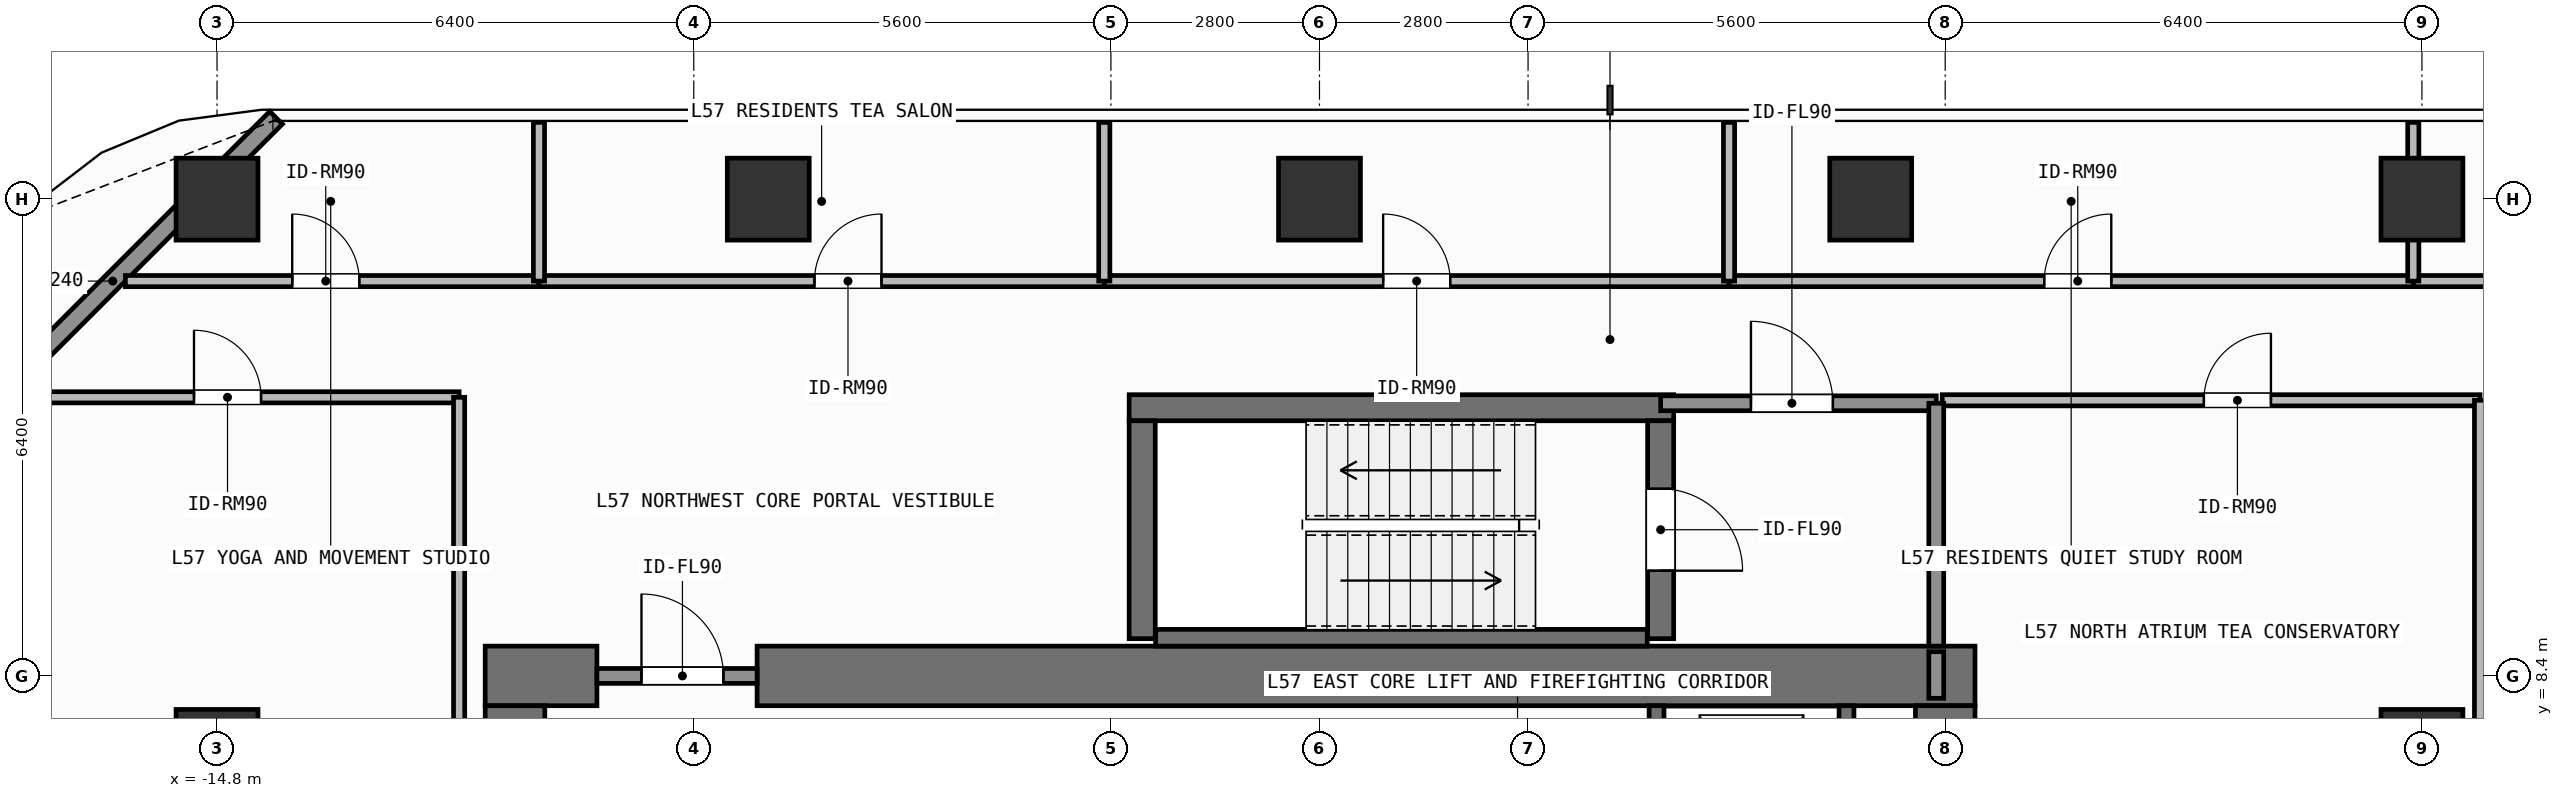
"""IFC4 building model, lengths in metres.
Left out: names, types, materials, properties, quantities, classifications, styles, units other than length and angle.
Written with IfcOpenShell. Run it as: python <this file> out.ifc"""

import sys

from ifc_helpers import new_model, si_unit, direction, frame, frame_2d, origin, origin_2d, place, context, subcontext, project, spatial, rectangle, extrude, element, fill, save


model = new_model("IFC4")
c1 = context("Model", 3, precision=1e-05, world=origin(), true_north=direction((0.0, 1.0)))
c2 = subcontext(c1, "Body", "Model", "MODEL_VIEW")
j1 = project(units=[si_unit("LENGTHUNIT", "METRE"), si_unit("PLANEANGLEUNIT", "RADIAN")], contexts=[c1])
p1 = place(None, origin())
s1 = spatial("IfcSite", under=j1, at=p1, CompositionType="ELEMENT")
p2 = place(p1, origin())
s2 = spatial("IfcBuilding", under=s1, at=p2, CompositionType="ELEMENT")
p3 = place(p2, frame((0.0, 0.0, 231.3)))
s3 = spatial("IfcBuildingStorey", under=s2, at=p3, CompositionType="ELEMENT", Elevation=231.3)
p4 = place(p3, frame((-11.2, 8.4, 0.0), z_axis=(0.0, 0.0, 1.0), x_axis=(1.0, 0.0, 0.0)))
e1 = element("IfcWall", 1, at=p4, inside=s3, PredefinedType="SHEAR", context=c2, shape_type="SweptSolid", body=[
    extrude(rectangle(XDim=1.5, YDim=0.8, at=frame_2d((0.75, 0.0))), origin(), (0.0, 0.0, 1.0), 3.9),
])
p5 = place(p3, frame((-7.55, 8.4, 0.0), z_axis=(0.0, 0.0, 1.0), x_axis=(1.0, 0.0, 0.0)))
e2 = element("IfcWall", 2, at=p5, inside=s3, PredefinedType="SHEAR", context=c2, shape_type="SweptSolid", body=[
    extrude(rectangle(XDim=16.35, YDim=0.8, at=frame_2d((8.175, 0.0))), origin(), (0.0, 0.0, 1.0), 3.9),
])
p6 = place(p3, frame((-10.8, -8.0, 0.0), z_axis=(0.0, 0.0, 1.0), x_axis=(0.0, 1.0, 0.0)))
e3 = element("IfcWall", 3, at=p6, inside=s3, PredefinedType="SHEAR", context=c2, shape_type="SweptSolid", body=[
    extrude(rectangle(XDim=16.0, YDim=0.8, at=frame_2d((8.0, 0.0))), origin(), (0.0, 0.0, 1.0), 3.9),
])
p7 = place(p3, frame((8.4, 5.825, 0.0), z_axis=(0.0, 0.0, 1.0), x_axis=(0.0, 1.0, 0.0)))
e4 = element("IfcWall", 4, at=p7, inside=s3, PredefinedType="SHEAR", context=c2, shape_type="SweptSolid", body=[
    extrude(rectangle(XDim=2.175, YDim=0.8, at=frame_2d((1.087, 0.0))), origin(), (0.0, 0.0, 1.0), 3.9),
])
p8 = place(p3, frame((-2.555, 12.0, 0.0), z_axis=(0.0, 0.0, 1.0), x_axis=(1.0, 0.0, 0.0)))
e5 = element("IfcWall", 5, at=p8, inside=s3, PredefinedType="SHEAR", context=c2, shape_type="SweptSolid", body=[
    extrude(rectangle(XDim=7.31, YDim=0.35, at=frame_2d((3.655, 0.0))), origin(), (0.0, 0.0, 1.0), 3.9),
])
p9 = place(p3, frame((-2.2, 8.913, 0.0), z_axis=(0.0, 0.0, 1.0), x_axis=(1.0, 0.0, 0.0)))
e6 = element("IfcWall", 6, at=p9, inside=s3, PredefinedType="SHEAR", context=c2, shape_type="SweptSolid", body=[
    extrude(rectangle(XDim=6.6, YDim=0.225, at=frame_2d((3.3, 0.0))), origin(), (0.0, 0.0, 1.0), 3.9),
])
p10 = place(p3, frame((-2.38, 8.9, 0.0), z_axis=(0.0, 0.0, 1.0), x_axis=(0.0, 1.0, 0.0)))
e7 = element("IfcWall", 7, at=p10, inside=s3, PredefinedType="SHEAR", context=c2, shape_type="SweptSolid", body=[
    extrude(rectangle(XDim=2.925, YDim=0.35, at=frame_2d((1.462, 0.0))), origin(), (0.0, 0.0, 1.0), 3.9),
])
p11 = place(p3, frame((4.58, 11.825, 0.0), z_axis=(0.0, 0.0, 1.0), x_axis=(0.0, -1.0, 0.0)))
e8 = element("IfcWall", 8, at=p11, inside=s3, PredefinedType="SHEAR", context=c2, shape_type="SweptSolid", body=[
    extrude(rectangle(XDim=2.925, YDim=0.35, at=frame_2d((1.462, 0.0))), origin(), (0.0, 0.0, 1.0), 3.9),
])
p12 = place(p11, frame((0.913, 0.0, 0.0)))
e9 = element("IfcOpeningElement", 9, at=p12, cuts=e8, PredefinedType="OPENING", context=c2, shape_type="SweptSolid", body=[
    extrude(rectangle(XDim=1.1, YDim=2.15, at=frame_2d((0.55, 1.075))), frame((0.0, 0.185, 0.0), z_axis=(0.0, -1.0, 0.0), x_axis=(1.0, 0.0, 0.0)), (0.0, 0.0, 1.0), 0.37),
])
for number, where, z_axis, x_axis in (
    (10, (-14.8, 14.8, 0.0), (0.0, 0.0, 1.0), (1.0, 0.0, 0.0)),
    (11, (-7.4, 14.8, 0.0), (0.0, 0.0, 1.0), (1.0, 0.0, 0.0)),
    (12, (0.0, 14.8, 0.0), (0.0, 0.0, 1.0), (1.0, 0.0, 0.0)),
    (13, (7.4, 14.8, 0.0), (0.0, 0.0, 1.0), (1.0, 0.0, 0.0)),
    (14, (14.8, 14.8, 0.0), (0.0, 0.0, 1.0), (1.0, 0.0, 0.0)),
    (15, (-14.8, 7.4, 0.0), (0.0, 0.0, 1.0), (1.0, 0.0, 0.0)),
    (16, (14.8, 7.4, 0.0), (0.0, 0.0, 1.0), (1.0, 0.0, 0.0)),
):
    element("IfcColumn", number, at=place(p3, frame(where, z_axis=z_axis, x_axis=x_axis)), inside=s3, PredefinedType="COLUMN", context=c2, shape_type="SweptSolid", body=[
        extrude(rectangle(XDim=1.1, YDim=1.1, at=origin_2d()), origin(), (0.0, 0.0, 1.0), 3.9),
    ])
p13 = place(p3, frame((-18.392, 11.508, 0.0), z_axis=(0.0, 0.0, 1.0), x_axis=(0.707106781187, 0.707106781187, 0.0)))
e17 = element("IfcWall", 17, at=p13, inside=s3, PredefinedType="SOLIDWALL", context=c2, shape_type="SweptSolid", body=[
    extrude(rectangle(XDim=6.201, YDim=0.24, at=frame_2d((3.101, 0.0))), origin(), (0.0, 0.0, 1.0), 3.6),
])
p14 = place(p3, frame((4.525, 5.825, 0.0), z_axis=(0.0, 0.0, 1.0), x_axis=(0.0, 1.0, 0.0)))
e18 = element("IfcWall", 18, at=p14, inside=s3, PredefinedType="SHEAR", context=c2, shape_type="SweptSolid", body=[
    extrude(rectangle(XDim=2.175, YDim=0.2, at=frame_2d((1.087, 0.0))), origin(), (0.0, 0.0, 1.0), 3.6),
])
p15 = place(p14, frame((0.425, 0.0, 0.0)))
e19 = element("IfcOpeningElement", 19, at=p15, cuts=e18, PredefinedType="OPENING", context=c2, shape_type="SweptSolid", body=[
    extrude(rectangle(XDim=1.1, YDim=2.2, at=frame_2d((0.55, 1.1))), frame((0.0, 0.11, 0.0), z_axis=(0.0, -1.0, 0.0), x_axis=(1.0, 0.0, 0.0)), (0.0, 0.0, 1.0), 0.22),
])
p16 = place(p3, frame((7.075, 5.825, 0.0), z_axis=(0.0, 0.0, 1.0), x_axis=(0.0, 1.0, 0.0)))
e20 = element("IfcWall", 20, at=p16, inside=s3, PredefinedType="SHEAR", context=c2, shape_type="SweptSolid", body=[
    extrude(rectangle(XDim=2.175, YDim=0.2, at=frame_2d((1.087, 0.0))), origin(), (0.0, 0.0, 1.0), 3.6),
])
p17 = place(p3, frame((4.58, 12.06, 0.0), z_axis=(0.0, 0.0, 1.0), x_axis=(1.0, 0.0, 0.0)))
e21 = element("IfcWall", 21, at=p17, inside=s3, PredefinedType="SOLIDWALL", context=c2, shape_type="SweptSolid", body=[
    extrude(rectangle(XDim=3.7, YDim=0.2, at=frame_2d((1.85, 0.0))), origin(), (0.0, 0.0, 1.0), 3.6),
])
p18 = place(p17, frame((1.212, 0.0, 0.0)))
e22 = element("IfcOpeningElement", 22, at=p18, cuts=e21, PredefinedType="OPENING", context=c2, shape_type="SweptSolid", body=[
    extrude(rectangle(XDim=1.1, YDim=2.15, at=frame_2d((0.55, 1.075))), frame((0.0, 0.11, 0.0), z_axis=(0.0, -1.0, 0.0), x_axis=(1.0, 0.0, 0.0)), (0.0, 0.0, 1.0), 0.22),
])
p19 = place(p3, frame((-9.7, 8.4, 0.0), z_axis=(0.0, 0.0, 1.0), x_axis=(1.0, 0.0, 0.0)))
e23 = element("IfcWall", 23, at=p19, inside=s3, PredefinedType="SOLIDWALL", context=c2, shape_type="SweptSolid", body=[
    extrude(rectangle(XDim=2.15, YDim=0.2, at=frame_2d((1.075, 0.0))), origin(), (0.0, 0.0, 1.0), 2.74),
])
p20 = place(p19, frame((0.598, 0.0, 0.0)))
e24 = element("IfcOpeningElement", 24, at=p20, cuts=e23, PredefinedType="OPENING", context=c2, shape_type="SweptSolid", body=[
    extrude(rectangle(XDim=1.1, YDim=2.15, at=frame_2d((0.55, 1.075))), frame((0.0, 0.11, 0.0), z_axis=(0.0, -1.0, 0.0), x_axis=(1.0, 0.0, 0.0)), (0.0, 0.0, 1.0), 0.22),
])
p21 = place(p3, frame((8.36, 12.1, 0.0), z_axis=(0.0, 0.0, 1.0), x_axis=(1.0, 0.0, 0.0)))
e25 = element("IfcWall", 25, at=p21, inside=s3, PredefinedType="PARTITIONING", context=c2, shape_type="SweptSolid", body=[
    extrude(rectangle(XDim=7.22, YDim=0.15, at=frame_2d((3.61, 0.0))), origin(), (0.0, 0.0, 1.0), 3.6),
])
p22 = place(p21, frame((3.513, 0.0, 0.0)))
e26 = element("IfcOpeningElement", 26, at=p22, cuts=e25, PredefinedType="OPENING", context=c2, shape_type="SweptSolid", body=[
    extrude(rectangle(XDim=0.9, YDim=2.1, at=frame_2d((0.45, 1.05))), frame((0.0, 0.085, 0.0), z_axis=(0.0, -1.0, 0.0), x_axis=(1.0, 0.0, 0.0)), (0.0, 0.0, 1.0), 0.17),
])
p23 = place(p3, frame((-16.03, 13.7, 0.0), z_axis=(0.0, 0.0, 1.0), x_axis=(1.0, 0.0, 0.0)))
e27 = element("IfcWall", 27, at=p23, inside=s3, PredefinedType="PARTITIONING", context=c2, shape_type="SweptSolid", body=[
    extrude(rectangle(XDim=5.552, YDim=0.15, at=frame_2d((2.776, 0.0))), origin(), (0.0, 0.0, 1.0), 3.6),
])
p24 = place(p23, frame((2.24, 0.0, 0.0)))
e28 = element("IfcOpeningElement", 28, at=p24, cuts=e27, PredefinedType="OPENING", context=c2, shape_type="SweptSolid", body=[
    extrude(rectangle(XDim=0.9, YDim=2.1, at=frame_2d((0.45, 1.05))), frame((0.0, 0.085, 0.0), z_axis=(0.0, -1.0, 0.0), x_axis=(1.0, 0.0, 0.0)), (0.0, 0.0, 1.0), 0.17),
])
p25 = place(p3, frame((-10.478, 13.7, 0.0), z_axis=(0.0, 0.0, 1.0), x_axis=(1.0, 0.0, 0.0)))
e29 = element("IfcWall", 29, at=p25, inside=s3, PredefinedType="PARTITIONING", context=c2, shape_type="SweptSolid", body=[
    extrude(rectangle(XDim=7.589, YDim=0.15, at=frame_2d((3.794, 0.0))), origin(), (0.0, 0.0, 1.0), 3.6),
])
p26 = place(p25, frame((3.698, 0.0, 0.0)))
e30 = element("IfcOpeningElement", 30, at=p26, cuts=e29, PredefinedType="OPENING", context=c2, shape_type="SweptSolid", body=[
    extrude(rectangle(XDim=0.9, YDim=2.1, at=frame_2d((0.45, 1.05))), frame((0.0, 0.085, 0.0), z_axis=(0.0, -1.0, 0.0), x_axis=(1.0, 0.0, 0.0)), (0.0, 0.0, 1.0), 0.17),
])
p27 = place(p3, frame((-2.889, 13.7, 0.0), z_axis=(0.0, 0.0, 1.0), x_axis=(1.0, 0.0, 0.0)))
e31 = element("IfcWall", 31, at=p27, inside=s3, PredefinedType="PARTITIONING", context=c2, shape_type="SweptSolid", body=[
    extrude(rectangle(XDim=8.387, YDim=0.15, at=frame_2d((4.193, 0.0))), origin(), (0.0, 0.0, 1.0), 3.6),
])
p28 = place(p27, frame((3.743, 0.0, 0.0)))
e32 = element("IfcOpeningElement", 32, at=p28, cuts=e31, PredefinedType="OPENING", context=c2, shape_type="SweptSolid", body=[
    extrude(rectangle(XDim=0.9, YDim=2.1, at=frame_2d((0.45, 1.05))), frame((0.0, 0.085, 0.0), z_axis=(0.0, -1.0, 0.0), x_axis=(1.0, 0.0, 0.0)), (0.0, 0.0, 1.0), 0.17),
])
p29 = place(p3, frame((5.498, 13.7, 0.0), z_axis=(0.0, 0.0, 1.0), x_axis=(1.0, 0.0, 0.0)))
e33 = element("IfcWall", 33, at=p29, inside=s3, PredefinedType="PARTITIONING", context=c2, shape_type="SweptSolid", body=[
    extrude(rectangle(XDim=9.186, YDim=0.15, at=frame_2d((4.593, 0.0))), origin(), (0.0, 0.0, 1.0), 3.6),
])
p30 = place(p29, frame((4.231, 0.0, 0.0)))
e34 = element("IfcOpeningElement", 34, at=p30, cuts=e33, PredefinedType="OPENING", context=c2, shape_type="SweptSolid", body=[
    extrude(rectangle(XDim=0.9, YDim=2.1, at=frame_2d((0.45, 1.05))), frame((0.0, 0.085, 0.0), z_axis=(0.0, -1.0, 0.0), x_axis=(1.0, 0.0, 0.0)), (0.0, 0.0, 1.0), 0.17),
])
p31 = place(p3, frame((14.684, 13.7, 0.0), z_axis=(0.0, 0.0, 1.0), x_axis=(1.0, 0.0, 0.0)))
e35 = element("IfcWall", 35, at=p31, inside=s3, PredefinedType="PARTITIONING", context=c2, shape_type="SweptSolid", body=[
    extrude(rectangle(XDim=9.146, YDim=0.15, at=frame_2d((4.573, 0.0))), origin(), (0.0, 0.0, 1.0), 3.6),
])
p32 = place(p31, frame((3.33, 0.0, 0.0)))
e36 = element("IfcOpeningElement", 36, at=p32, cuts=e35, PredefinedType="OPENING", context=c2, shape_type="SweptSolid", body=[
    extrude(rectangle(XDim=0.9, YDim=2.1, at=frame_2d((0.45, 1.05))), frame((0.0, 0.085, 0.0), z_axis=(0.0, -1.0, 0.0), x_axis=(1.0, 0.0, 0.0)), (0.0, 0.0, 1.0), 0.17),
])
p33 = place(p3, frame((-17.59, 12.14, 0.0), z_axis=(0.0, 0.0, 1.0), x_axis=(1.0, 0.0, 0.0)))
e37 = element("IfcWall", 37, at=p33, inside=s3, PredefinedType="PARTITIONING", context=c2, shape_type="SweptSolid", body=[
    extrude(rectangle(XDim=6.04, YDim=0.15, at=frame_2d((3.02, 0.0))), origin(), (0.0, 0.0, 1.0), 3.6),
])
p34 = place(p33, frame((2.481, 0.0, 0.0)))
e38 = element("IfcOpeningElement", 38, at=p34, cuts=e37, PredefinedType="OPENING", context=c2, shape_type="SweptSolid", body=[
    extrude(rectangle(XDim=0.9, YDim=2.1, at=frame_2d((0.45, 1.05))), frame((0.0, 0.085, 0.0), z_axis=(0.0, -1.0, 0.0), x_axis=(1.0, 0.0, 0.0)), (0.0, 0.0, 1.0), 0.17),
])
p35 = place(p3, frame((8.28, 8.8, 0.0), z_axis=(0.0, 0.0, 1.0), x_axis=(0.0, 1.0, 0.0)))
e39 = element("IfcWall", 39, at=p35, inside=s3, PredefinedType="SOLIDWALL", context=c2, shape_type="SweptSolid", body=[
    extrude(rectangle(XDim=3.26, YDim=0.2, at=frame_2d((1.63, 0.0))), origin(), (0.0, 0.0, 1.0), 3.6),
])
p36 = place(p3, frame((8.28, 8.1, 0.0), z_axis=(0.0, 0.0, 1.0), x_axis=(0.0, 1.0, 0.0)))
e40 = element("IfcWall", 40, at=p36, inside=s3, PredefinedType="SOLIDWALL", context=c2, shape_type="SweptSolid", body=[
    extrude(rectangle(XDim=0.625, YDim=0.2, at=frame_2d((0.312, 0.0))), origin(), (0.0, 0.0, 1.0), 3.6),
])
p37 = place(p3, frame((15.58, 5.85, 0.0), z_axis=(0.0, 0.0, 1.0), x_axis=(0.0, 1.0, 0.0)))
e41 = element("IfcWall", 41, at=p37, inside=s3, PredefinedType="PARTITIONING", context=c2, shape_type="SweptSolid", body=[
    extrude(rectangle(XDim=6.25, YDim=0.15, at=frame_2d((3.125, 0.0))), origin(), (0.0, 0.0, 1.0), 3.6),
])
for number, where, z_axis, x_axis in (
    (42, (-10.478, 13.7, 0.0), (0.0, 0.0, 1.0), (0.0, 1.0, 0.0)),
    (43, (-2.889, 13.7, 0.0), (0.0, 0.0, 1.0), (0.0, 1.0, 0.0)),
    (44, (5.498, 13.7, 0.0), (0.0, 0.0, 1.0), (0.0, 1.0, 0.0)),
):
    element("IfcWall", number, at=place(p3, frame(where, z_axis=z_axis, x_axis=x_axis)), inside=s3, PredefinedType="PARTITIONING", context=c2, shape_type="SweptSolid", body=[
        extrude(rectangle(XDim=2.13, YDim=0.15, at=frame_2d((1.065, 0.0))), origin(), (0.0, 0.0, 1.0), 3.6),
    ])
p38 = place(p3, frame((14.684, 13.7, 0.0), z_axis=(0.0, 0.0, 1.0), x_axis=(0.0, 1.0, 0.0)))
e45 = element("IfcWall", 45, at=p38, inside=s3, PredefinedType="PARTITIONING", context=c2, shape_type="SweptSolid", body=[
    extrude(rectangle(XDim=2.13, YDim=0.15, at=frame_2d((1.065, 0.0))), origin(), (0.0, 0.0, 1.0), 3.102),
])
p39 = place(p3, frame((-11.55, 1.8, 0.0), z_axis=(0.0, 0.0, 1.0), x_axis=(0.0, 1.0, 0.0)))
e46 = element("IfcWall", 46, at=p39, inside=s3, PredefinedType="PARTITIONING", context=c2, shape_type="SweptSolid", body=[
    extrude(rectangle(XDim=10.34, YDim=0.15, at=frame_2d((5.17, 0.0))), origin(), (0.0, 0.0, 1.0), 3.6),
])
p40 = place(p12, origin())
e47 = element("IfcDoor", 47, at=p40, inside=s3, OperationType="SINGLE_SWING_RIGHT", PredefinedType="DOOR", context=c2, shape_type="SweptSolid", body=[
    extrude(rectangle(XDim=1.1, YDim=2.15, at=frame_2d((0.55, 1.075))), frame((0.0, 0.025, 0.0), z_axis=(0.0, -1.0, 0.0), x_axis=(1.0, 0.0, 0.0)), (0.0, 0.0, 1.0), 0.05),
])
fill(e9, e47)
p41 = place(p18, origin())
e48 = element("IfcDoor", 48, at=p41, inside=s3, OperationType="SINGLE_SWING_LEFT", PredefinedType="DOOR", context=c2, shape_type="SweptSolid", body=[
    extrude(rectangle(XDim=1.1, YDim=2.15, at=frame_2d((0.55, 1.075))), frame((0.0, 0.025, 0.0), z_axis=(0.0, -1.0, 0.0), x_axis=(1.0, 0.0, 0.0)), (0.0, 0.0, 1.0), 0.05),
])
fill(e22, e48)
p42 = place(p20, origin())
e49 = element("IfcDoor", 49, at=p42, inside=s3, OperationType="SINGLE_SWING_LEFT", PredefinedType="DOOR", context=c2, shape_type="SweptSolid", body=[
    extrude(rectangle(XDim=1.1, YDim=2.15, at=frame_2d((0.55, 1.075))), frame((0.0, 0.025, 0.0), z_axis=(0.0, -1.0, 0.0), x_axis=(1.0, 0.0, 0.0)), (0.0, 0.0, 1.0), 0.05),
])
fill(e24, e49)
p43 = place(p22, origin())
e50 = element("IfcDoor", 50, at=p43, inside=s3, OperationType="SINGLE_SWING_RIGHT", PredefinedType="DOOR", context=c2, shape_type="SweptSolid", body=[
    extrude(rectangle(XDim=0.9, YDim=2.1, at=frame_2d((0.45, 1.05))), frame((0.0, 0.025, 0.0), z_axis=(0.0, -1.0, 0.0), x_axis=(1.0, 0.0, 0.0)), (0.0, 0.0, 1.0), 0.05),
])
fill(e26, e50)
p44 = place(p24, origin())
e51 = element("IfcDoor", 51, at=p44, inside=s3, OperationType="SINGLE_SWING_LEFT", PredefinedType="DOOR", context=c2, shape_type="SweptSolid", body=[
    extrude(rectangle(XDim=0.9, YDim=2.1, at=frame_2d((0.45, 1.05))), frame((0.0, 0.025, 0.0), z_axis=(0.0, -1.0, 0.0), x_axis=(1.0, 0.0, 0.0)), (0.0, 0.0, 1.0), 0.05),
])
fill(e28, e51)
p45 = place(p26, origin())
e52 = element("IfcDoor", 52, at=p45, inside=s3, OperationType="SINGLE_SWING_RIGHT", PredefinedType="DOOR", context=c2, shape_type="SweptSolid", body=[
    extrude(rectangle(XDim=0.9, YDim=2.1, at=frame_2d((0.45, 1.05))), frame((0.0, 0.025, 0.0), z_axis=(0.0, -1.0, 0.0), x_axis=(1.0, 0.0, 0.0)), (0.0, 0.0, 1.0), 0.05),
])
fill(e30, e52)
p46 = place(p28, origin())
e53 = element("IfcDoor", 53, at=p46, inside=s3, OperationType="SINGLE_SWING_LEFT", PredefinedType="DOOR", context=c2, shape_type="SweptSolid", body=[
    extrude(rectangle(XDim=0.9, YDim=2.1, at=frame_2d((0.45, 1.05))), frame((0.0, 0.025, 0.0), z_axis=(0.0, -1.0, 0.0), x_axis=(1.0, 0.0, 0.0)), (0.0, 0.0, 1.0), 0.05),
])
fill(e32, e53)
p47 = place(p30, origin())
e54 = element("IfcDoor", 54, at=p47, inside=s3, OperationType="SINGLE_SWING_RIGHT", PredefinedType="DOOR", context=c2, shape_type="SweptSolid", body=[
    extrude(rectangle(XDim=0.9, YDim=2.1, at=frame_2d((0.45, 1.05))), frame((0.0, 0.025, 0.0), z_axis=(0.0, -1.0, 0.0), x_axis=(1.0, 0.0, 0.0)), (0.0, 0.0, 1.0), 0.05),
])
fill(e34, e54)
p48 = place(p34, origin())
e55 = element("IfcDoor", 55, at=p48, inside=s3, OperationType="SINGLE_SWING_LEFT", PredefinedType="DOOR", context=c2, shape_type="SweptSolid", body=[
    extrude(rectangle(XDim=0.9, YDim=2.1, at=frame_2d((0.45, 1.05))), frame((0.0, 0.025, 0.0), z_axis=(0.0, -1.0, 0.0), x_axis=(1.0, 0.0, 0.0)), (0.0, 0.0, 1.0), 0.05),
])
fill(e38, e55)
save(model, sys.argv[1])
